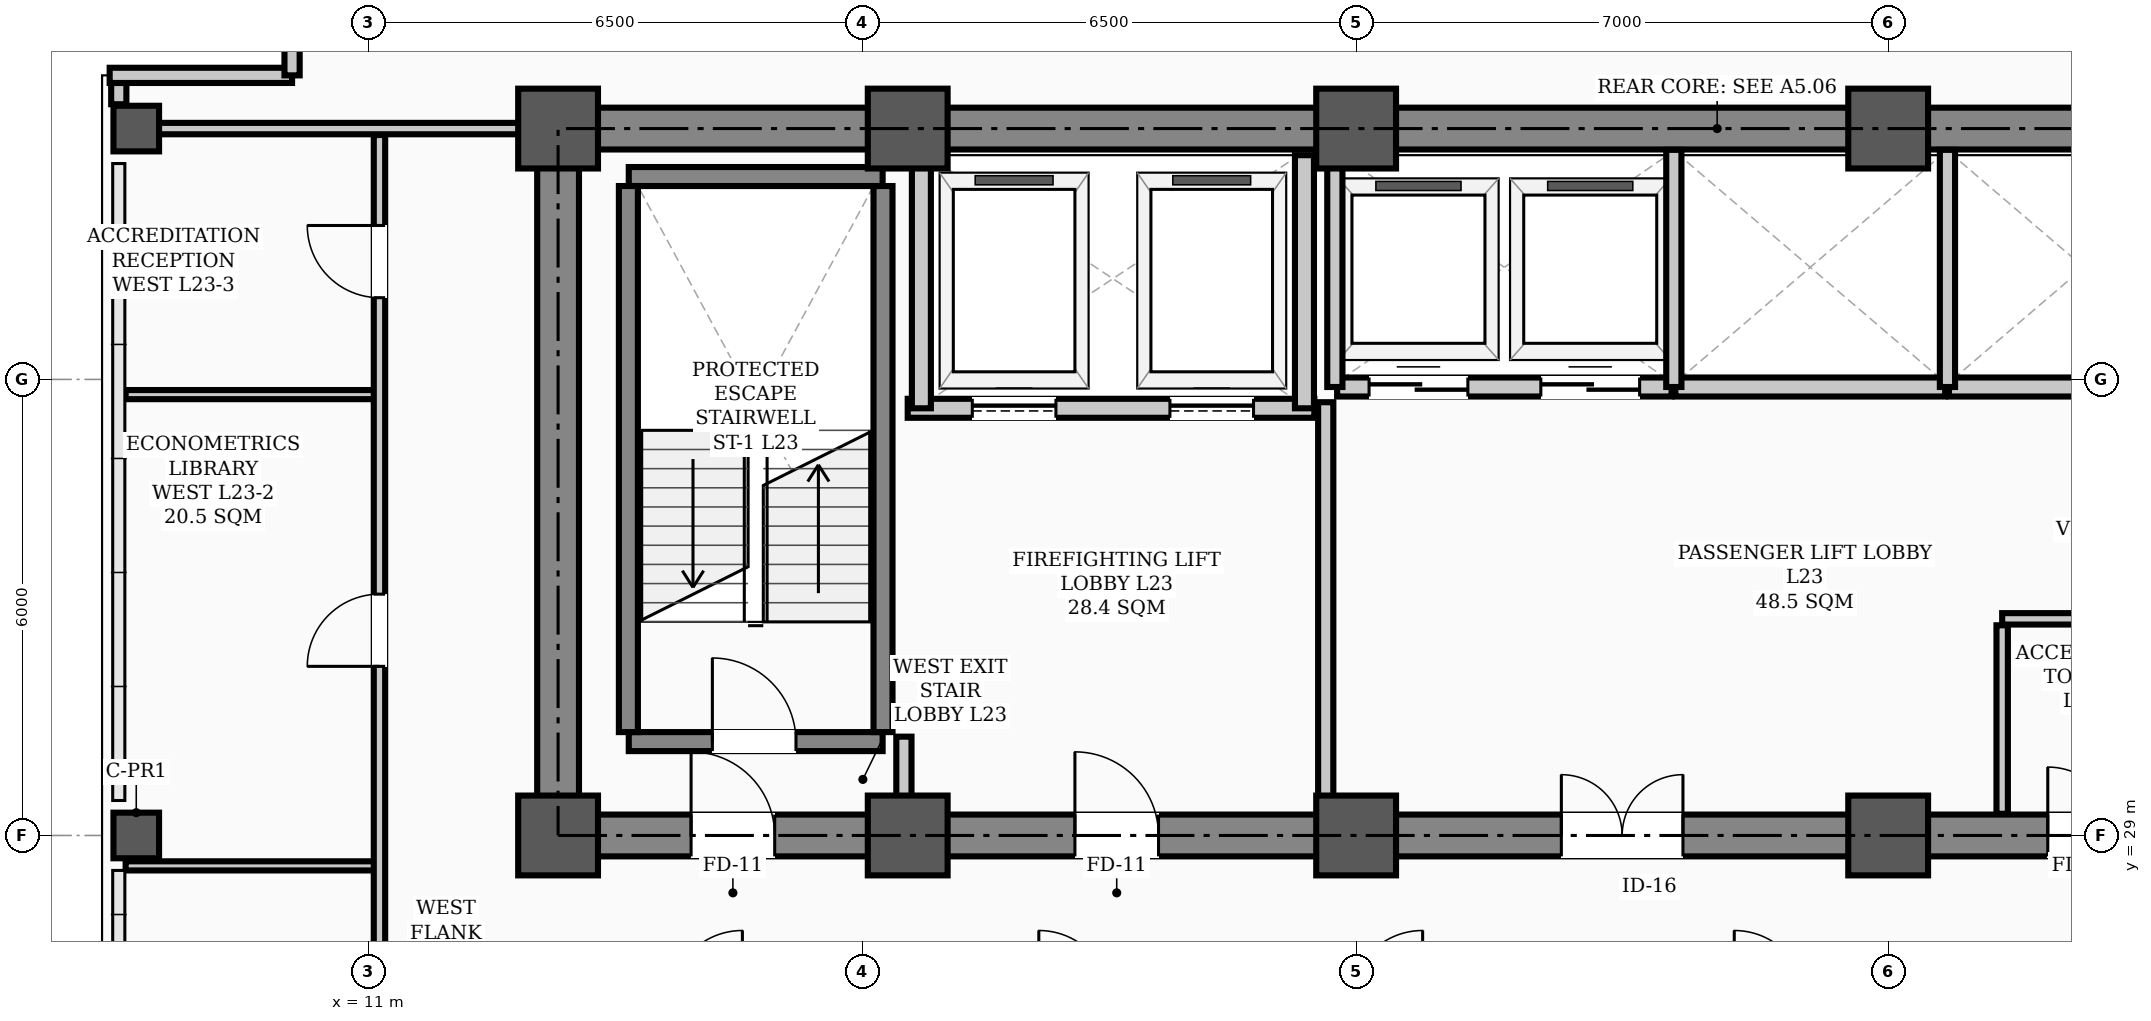
"""IFC4 building model, lengths in metres.
Left out: names, types, materials, properties, quantities, classifications, styles, units other than length and angle.
Written with IfcOpenShell. Run it as: python <this file> out.ifc"""

import sys

from ifc_helpers import new_model, si_unit, direction, frame, frame_2d, origin, origin_2d, place, context, subcontext, project, spatial, rectangle, hollow_rectangle, extrude, element, fill, save


model = new_model("IFC4")
c1 = context("Model", 3, precision=1e-05, world=origin(), true_north=direction((0.0, 1.0)))
c2 = subcontext(c1, "Body", "Model", "MODEL_VIEW")
j1 = project(units=[si_unit("LENGTHUNIT", "METRE"), si_unit("PLANEANGLEUNIT", "RADIAN")], contexts=[c1])
p1 = place(None, origin())
s1 = spatial("IfcSite", under=j1, at=p1, CompositionType="ELEMENT")
p2 = place(p1, origin())
s2 = spatial("IfcBuilding", under=s1, at=p2, CompositionType="ELEMENT")
p3 = place(p2, frame((0.0, 0.0, 92.8)))
s3 = spatial("IfcBuildingStorey", under=s2, at=p3, CompositionType="ELEMENT", Elevation=92.8)
for number, where, z_axis, x_axis in (
    (1, (13.5, 29.0, 0.0), (0.0, 0.0, 1.0), (1.0, 0.0, 0.0)),
    (2, (13.5, 38.3, 0.0), (0.0, 0.0, 1.0), (1.0, 0.0, 0.0)),
    (3, (18.1, 29.0, 0.0), (0.0, 0.0, 1.0), (1.0, 0.0, 0.0)),
    (4, (18.1, 38.3, 0.0), (0.0, 0.0, 1.0), (1.0, 0.0, 0.0)),
    (5, (24.0, 29.0, 0.0), (0.0, 0.0, 1.0), (1.0, 0.0, 0.0)),
    (6, (24.0, 38.3, 0.0), (0.0, 0.0, 1.0), (1.0, 0.0, 0.0)),
    (7, (31.0, 29.0, 0.0), (0.0, 0.0, 1.0), (1.0, 0.0, 0.0)),
    (8, (31.0, 38.3, 0.0), (0.0, 0.0, 1.0), (1.0, 0.0, 0.0)),
):
    element("IfcColumn", number, at=place(p3, frame(where, z_axis=z_axis, x_axis=x_axis)), inside=s3, PredefinedType="COLUMN", context=c2, shape_type="SweptSolid", body=[
        extrude(hollow_rectangle(XDim=1.05, YDim=1.05, WallThickness=0.038, InnerFilletRadius=0.019, OuterFilletRadius=0.057, at=origin_2d()), origin(), (0.0, 0.0, 1.0), 3.9),
    ])
for number, where, z_axis, x_axis in (
    (9, (7.95, 29.0, 0.0), (0.0, 0.0, 1.0), (1.0, 0.0, 0.0)),
    (10, (7.95, 38.3, 0.0), (0.0, 0.0, 1.0), (1.0, 0.0, 0.0)),
):
    element("IfcColumn", number, at=place(p3, frame(where, z_axis=z_axis, x_axis=x_axis)), inside=s3, PredefinedType="COLUMN", context=c2, shape_type="SweptSolid", body=[
        extrude(hollow_rectangle(XDim=0.6, YDim=0.6, WallThickness=0.026, InnerFilletRadius=0.013, OuterFilletRadius=0.039, at=origin_2d()), origin(), (0.0, 0.0, 1.0), 3.9),
    ])
p4 = place(p3, frame((7.72, 38.62, 0.0), z_axis=(0.0, 0.0, 1.0), x_axis=(0.0, 1.0, 0.0)))
e11 = element("IfcWall", 11, at=p4, inside=s3, PredefinedType="PARAPET", context=c2, shape_type="SweptSolid", body=[
    extrude(rectangle(XDim=0.28, YDim=0.2, at=frame_2d((0.14, 0.0))), origin(), (0.0, 0.0, 1.0), 1.2),
])
for number, where, z_axis, x_axis in (
    (12, (7.6, 39.0, 0.0), (0.0, 0.0, 1.0), (1.0, 0.0, 0.0)),
    (13, (10.0, 39.0, 0.0), (0.0, 0.0, 1.0), (0.0, 1.0, 0.0)),
):
    element("IfcWall", number, at=place(p3, frame(where, z_axis=z_axis, x_axis=x_axis)), inside=s3, PredefinedType="PARAPET", context=c2, shape_type="SweptSolid", body=[
        extrude(rectangle(XDim=2.4, YDim=0.2, at=frame_2d((1.2, 0.0))), origin(), (0.0, 0.0, 1.0), 1.2),
    ])
p5 = place(p3, frame((13.5, 29.0, 0.0), z_axis=(0.0, 0.0, 1.0), x_axis=(1.0, 0.0, 0.0)))
e14 = element("IfcWall", 14, at=p5, inside=s3, PredefinedType="SHEAR", context=c2, shape_type="SweptSolid", body=[
    extrude(rectangle(XDim=30.5, YDim=0.55, at=frame_2d((15.25, 0.0))), origin(), (0.0, 0.0, 1.0), 3.72),
])
p6 = place(p5, frame((1.75, 0.0, 0.0)))
e15 = element("IfcOpeningElement", 15, at=p6, cuts=e14, PredefinedType="OPENING", context=c2, shape_type="SweptSolid", body=[
    extrude(rectangle(XDim=1.1, YDim=2.08, at=frame_2d((0.55, 1.04))), frame((0.0, 0.285, 0.0), z_axis=(0.0, -1.0, 0.0), x_axis=(1.0, 0.0, 0.0)), (0.0, 0.0, 1.0), 0.57),
])
p7 = place(p5, frame((26.7, 0.0, 0.0)))
e16 = element("IfcOpeningElement", 16, at=p7, cuts=e14, PredefinedType="OPENING", context=c2, shape_type="SweptSolid", body=[
    extrude(rectangle(XDim=1.1, YDim=2.08, at=frame_2d((0.55, 1.04))), frame((0.0, 0.285, 0.0), z_axis=(0.0, -1.0, 0.0), x_axis=(1.0, 0.0, 0.0)), (0.0, 0.0, 1.0), 0.57),
])
p8 = place(p5, frame((6.8, 0.0, 0.0)))
e17 = element("IfcOpeningElement", 17, at=p8, cuts=e14, PredefinedType="OPENING", context=c2, shape_type="SweptSolid", body=[
    extrude(rectangle(XDim=1.1, YDim=2.08, at=frame_2d((0.55, 1.04))), frame((0.0, 0.285, 0.0), z_axis=(0.0, -1.0, 0.0), x_axis=(1.0, 0.0, 0.0)), (0.0, 0.0, 1.0), 0.57),
])
p9 = place(p5, frame((13.2, 0.0, 0.0)))
e18 = element("IfcOpeningElement", 18, at=p9, cuts=e14, PredefinedType="OPENING", context=c2, shape_type="SweptSolid", body=[
    extrude(rectangle(XDim=1.6, YDim=2.08, at=frame_2d((0.8, 1.04))), frame((0.0, 0.285, 0.0), z_axis=(0.0, -1.0, 0.0), x_axis=(1.0, 0.0, 0.0)), (0.0, 0.0, 1.0), 0.57),
])
p10 = place(p5, frame((19.6, 0.0, 0.0)))
e19 = element("IfcOpeningElement", 19, at=p10, cuts=e14, PredefinedType="OPENING", context=c2, shape_type="SweptSolid", body=[
    extrude(rectangle(XDim=0.9, YDim=2.08, at=frame_2d((0.45, 1.04))), frame((0.0, 0.285, 0.0), z_axis=(0.0, -1.0, 0.0), x_axis=(1.0, 0.0, 0.0)), (0.0, 0.0, 1.0), 0.57),
])
p11 = place(p5, frame((21.6, 0.0, 0.0)))
e20 = element("IfcOpeningElement", 20, at=p11, cuts=e14, PredefinedType="OPENING", context=c2, shape_type="SweptSolid", body=[
    extrude(rectangle(XDim=0.9, YDim=2.08, at=frame_2d((0.45, 1.04))), frame((0.0, 0.285, 0.0), z_axis=(0.0, -1.0, 0.0), x_axis=(1.0, 0.0, 0.0)), (0.0, 0.0, 1.0), 0.57),
])
p12 = place(p3, frame((13.5, 38.3, 0.0), z_axis=(0.0, 0.0, 1.0), x_axis=(1.0, 0.0, 0.0)))
e21 = element("IfcWall", 21, at=p12, inside=s3, PredefinedType="SHEAR", context=c2, shape_type="SweptSolid", body=[
    extrude(rectangle(XDim=30.5, YDim=0.55, at=frame_2d((15.25, 0.0))), origin(), (0.0, 0.0, 1.0), 3.72),
])
p13 = place(p3, frame((13.5, 29.35, 0.0), z_axis=(0.0, 0.0, 1.0), x_axis=(0.0, 1.0, 0.0)))
e22 = element("IfcWall", 22, at=p13, inside=s3, PredefinedType="SHEAR", context=c2, shape_type="SweptSolid", body=[
    extrude(rectangle(XDim=8.6, YDim=0.55, at=frame_2d((4.3, 0.0))), origin(), (0.0, 0.0, 1.0), 3.72),
])
p14 = place(p3, frame((14.43, 30.235, 0.0), z_axis=(0.0, 0.0, 1.0), x_axis=(1.0, 0.0, 0.0)))
e23 = element("IfcWall", 23, at=p14, inside=s3, PredefinedType="STANDARD", context=c2, shape_type="SweptSolid", body=[
    extrude(rectangle(XDim=3.34, YDim=0.25, at=frame_2d((1.67, 0.0))), origin(), (0.0, 0.0, 1.0), 3.72),
])
p15 = place(p14, frame((1.1, 0.0, 0.0)))
e24 = element("IfcOpeningElement", 24, at=p15, cuts=e23, PredefinedType="OPENING", context=c2, shape_type="SweptSolid", body=[
    extrude(rectangle(XDim=1.1, YDim=2.08, at=frame_2d((0.55, 1.04))), frame((0.0, 0.135, 0.0), z_axis=(0.0, -1.0, 0.0), x_axis=(1.0, 0.0, 0.0)), (0.0, 0.0, 1.0), 0.27),
])
p16 = place(p3, frame((14.43, 37.669, 0.0), z_axis=(0.0, 0.0, 1.0), x_axis=(1.0, 0.0, 0.0)))
e25 = element("IfcWall", 25, at=p16, inside=s3, PredefinedType="STANDARD", context=c2, shape_type="SweptSolid", body=[
    extrude(rectangle(XDim=3.34, YDim=0.25, at=frame_2d((1.67, 0.0))), origin(), (0.0, 0.0, 1.0), 3.72),
])
for number, where, z_axis, x_axis in (
    (26, (14.425, 30.36, 0.0), (0.0, 0.0, 1.0), (0.0, 1.0, 0.0)),
    (27, (17.775, 30.36, 0.0), (0.0, 0.0, 1.0), (0.0, 1.0, 0.0)),
):
    element("IfcWall", number, at=place(p3, frame(where, z_axis=z_axis, x_axis=x_axis)), inside=s3, PredefinedType="STANDARD", context=c2, shape_type="SweptSolid", body=[
        extrude(rectangle(XDim=7.184, YDim=0.25, at=frame_2d((3.592, 0.0))), origin(), (0.0, 0.0, 1.0), 3.72),
    ])
p17 = place(p3, frame((18.1, 34.62, 0.0), z_axis=(0.0, 0.0, 1.0), x_axis=(1.0, 0.0, 0.0)))
e28 = element("IfcWall", 28, at=p17, inside=s3, PredefinedType="STANDARD", context=c2, shape_type="SweptSolid", body=[
    extrude(rectangle(XDim=5.35, YDim=0.25, at=frame_2d((2.675, 0.0))), origin(), (0.0, 0.0, 1.0), 3.72),
])
p18 = place(p17, frame((0.85, 0.0, 0.0)))
e29 = element("IfcOpeningElement", 29, at=p18, cuts=e28, PredefinedType="OPENING", context=c2, shape_type="SweptSolid", body=[
    extrude(rectangle(XDim=1.1, YDim=2.08, at=frame_2d((0.55, 1.04))), frame((0.0, 0.135, 0.0), z_axis=(0.0, -1.0, 0.0), x_axis=(1.0, 0.0, 0.0)), (0.0, 0.0, 1.0), 0.27),
])
p19 = place(p17, frame((3.45, 0.0, 0.0)))
e30 = element("IfcOpeningElement", 30, at=p19, cuts=e28, PredefinedType="OPENING", context=c2, shape_type="SweptSolid", body=[
    extrude(rectangle(XDim=1.1, YDim=2.08, at=frame_2d((0.55, 1.04))), frame((0.0, 0.135, 0.0), z_axis=(0.0, -1.0, 0.0), x_axis=(1.0, 0.0, 0.0)), (0.0, 0.0, 1.0), 0.27),
])
for number, where, z_axis, x_axis in (
    (31, (18.28, 34.62, 0.0), (0.0, 0.0, 1.0), (0.0, 1.0, 0.0)),
    (32, (23.32, 34.62, 0.0), (0.0, 0.0, 1.0), (0.0, 1.0, 0.0)),
):
    element("IfcWall", number, at=place(p3, frame(where, z_axis=z_axis, x_axis=x_axis)), inside=s3, PredefinedType="STANDARD", context=c2, shape_type="SweptSolid", body=[
        extrude(rectangle(XDim=3.33, YDim=0.25, at=frame_2d((1.665, 0.0))), origin(), (0.0, 0.0, 1.0), 3.3),
    ])
p20 = place(p3, frame((23.75, 34.9, 0.0), z_axis=(0.0, 0.0, 1.0), x_axis=(1.0, 0.0, 0.0)))
e33 = element("IfcWall", 33, at=p20, inside=s3, PredefinedType="STANDARD", context=c2, shape_type="SweptSolid", body=[
    extrude(rectangle(XDim=4.4, YDim=0.25, at=frame_2d((2.2, 0.0))), origin(), (0.0, 0.0, 1.0), 3.72),
])
p21 = place(p20, frame((0.42, 0.0, 0.0)))
e34 = element("IfcOpeningElement", 34, at=p21, cuts=e33, PredefinedType="OPENING", context=c2, shape_type="SweptSolid", body=[
    extrude(rectangle(XDim=1.3, YDim=2.08, at=frame_2d((0.65, 1.04))), frame((0.0, 0.135, 0.0), z_axis=(0.0, -1.0, 0.0), x_axis=(1.0, 0.0, 0.0)), (0.0, 0.0, 1.0), 0.27),
])
p22 = place(p20, frame((2.68, 0.0, 0.0)))
e35 = element("IfcOpeningElement", 35, at=p22, cuts=e33, PredefinedType="OPENING", context=c2, shape_type="SweptSolid", body=[
    extrude(rectangle(XDim=1.3, YDim=2.08, at=frame_2d((0.65, 1.04))), frame((0.0, 0.135, 0.0), z_axis=(0.0, -1.0, 0.0), x_axis=(1.0, 0.0, 0.0)), (0.0, 0.0, 1.0), 0.27),
])
p23 = place(p3, frame((28.2, 34.9, 0.0), z_axis=(0.0, 0.0, 1.0), x_axis=(1.0, 0.0, 0.0)))
e36 = element("IfcWall", 36, at=p23, inside=s3, PredefinedType="STANDARD", context=c2, shape_type="SweptSolid", body=[
    extrude(rectangle(XDim=3.55, YDim=0.25, at=frame_2d((1.775, 0.0))), origin(), (0.0, 0.0, 1.0), 3.72),
])
p24 = place(p3, frame((31.8, 34.9, 0.0), z_axis=(0.0, 0.0, 1.0), x_axis=(1.0, 0.0, 0.0)))
e37 = element("IfcWall", 37, at=p24, inside=s3, PredefinedType="STANDARD", context=c2, shape_type="SweptSolid", body=[
    extrude(rectangle(XDim=3.6, YDim=0.25, at=frame_2d((1.8, 0.0))), origin(), (0.0, 0.0, 1.0), 3.72),
])
p25 = place(p3, frame((32.5, 31.85, 0.0), z_axis=(0.0, 0.0, 1.0), x_axis=(1.0, 0.0, 0.0)))
e38 = element("IfcWall", 38, at=p25, inside=s3, PredefinedType="PARTITIONING", context=c2, shape_type="SweptSolid", body=[
    extrude(rectangle(XDim=4.1, YDim=0.15, at=frame_2d((2.05, 0.0))), origin(), (0.0, 0.0, 1.0), 3.72),
])
p26 = place(p3, frame((7.81, 38.3, 0.0), z_axis=(0.0, 0.0, 1.0), x_axis=(1.0, 0.0, 0.0)))
e39 = element("IfcWall", 39, at=p26, inside=s3, PredefinedType="PARTITIONING", context=c2, shape_type="SweptSolid", body=[
    extrude(rectangle(XDim=5.69, YDim=0.15, at=frame_2d((2.845, 0.0))), origin(), (0.0, 0.0, 1.0), 3.0),
])
p27 = place(p3, frame((7.81, 28.6, 0.0), z_axis=(0.0, 0.0, 1.0), x_axis=(1.0, 0.0, 0.0)))
e40 = element("IfcWall", 40, at=p27, inside=s3, PredefinedType="PARTITIONING", context=c2, shape_type="SweptSolid", body=[
    extrude(rectangle(XDim=3.34, YDim=0.12, at=frame_2d((1.67, 0.0))), origin(), (0.0, 0.0, 1.0), 3.0),
])
p28 = place(p3, frame((7.81, 34.8, 0.0), z_axis=(0.0, 0.0, 1.0), x_axis=(1.0, 0.0, 0.0)))
e41 = element("IfcWall", 41, at=p28, inside=s3, PredefinedType="PARTITIONING", context=c2, shape_type="SweptSolid", body=[
    extrude(rectangle(XDim=3.34, YDim=0.12, at=frame_2d((1.67, 0.0))), origin(), (0.0, 0.0, 1.0), 3.212),
])
p29 = place(p3, frame((18.05, 29.285, 0.0), z_axis=(0.0, 0.0, 1.0), x_axis=(0.0, 1.0, 0.0)))
e42 = element("IfcWall", 42, at=p29, inside=s3, PredefinedType="STANDARD", context=c2, shape_type="SweptSolid", body=[
    extrude(rectangle(XDim=1.015, YDim=0.2, at=frame_2d((0.508, 0.0))), origin(), (0.0, 0.0, 1.0), 3.3),
])
p30 = place(p3, frame((23.6, 29.285, 0.0), z_axis=(0.0, 0.0, 1.0), x_axis=(0.0, 1.0, 0.0)))
e43 = element("IfcWall", 43, at=p30, inside=s3, PredefinedType="STANDARD", context=c2, shape_type="SweptSolid", body=[
    extrude(rectangle(XDim=5.415, YDim=0.2, at=frame_2d((2.708, 0.0))), origin(), (0.0, 0.0, 1.0), 3.1),
])
p31 = place(p3, frame((32.5, 29.285, 0.0), z_axis=(0.0, 0.0, 1.0), x_axis=(0.0, 1.0, 0.0)))
e44 = element("IfcWall", 44, at=p31, inside=s3, PredefinedType="PARTITIONING", context=c2, shape_type="SweptSolid", body=[
    extrude(rectangle(XDim=2.48, YDim=0.15, at=frame_2d((1.24, 0.0))), origin(), (0.0, 0.0, 1.0), 3.3),
])
p32 = place(p3, frame((11.15, 17.635, 0.0), z_axis=(0.0, 0.0, 1.0), x_axis=(0.0, 1.0, 0.0)))
e45 = element("IfcWall", 45, at=p32, inside=s3, PredefinedType="PARTITIONING", context=c2, shape_type="SweptSolid", body=[
    extrude(rectangle(XDim=20.58, YDim=0.15, at=frame_2d((10.29, 0.0))), origin(), (0.0, 0.0, 1.0), 3.0),
])
p33 = place(p32, frame((4.965, 0.0, 0.0)))
e46 = element("IfcOpeningElement", 46, at=p33, cuts=e45, PredefinedType="OPENING", context=c2, shape_type="SweptSolid", body=[
    extrude(rectangle(XDim=0.95, YDim=2.08, at=frame_2d((0.475, 1.04))), frame((0.0, 0.085, 0.0), z_axis=(0.0, -1.0, 0.0), x_axis=(1.0, 0.0, 0.0)), (0.0, 0.0, 1.0), 0.17),
])
p34 = place(p32, frame((13.59, 0.0, 0.0)))
e47 = element("IfcOpeningElement", 47, at=p34, cuts=e45, PredefinedType="OPENING", context=c2, shape_type="SweptSolid", body=[
    extrude(rectangle(XDim=0.95, YDim=2.08, at=frame_2d((0.475, 1.04))), frame((0.0, 0.085, 0.0), z_axis=(0.0, -1.0, 0.0), x_axis=(1.0, 0.0, 0.0)), (0.0, 0.0, 1.0), 0.17),
])
p35 = place(p32, frame((18.44, 0.0, 0.0)))
e48 = element("IfcOpeningElement", 48, at=p35, cuts=e45, PredefinedType="OPENING", context=c2, shape_type="SweptSolid", body=[
    extrude(rectangle(XDim=0.95, YDim=2.08, at=frame_2d((0.475, 1.04))), frame((0.0, 0.085, 0.0), z_axis=(0.0, -1.0, 0.0), x_axis=(1.0, 0.0, 0.0)), (0.0, 0.0, 1.0), 0.17),
])
p36 = place(p3, frame((23.72, 34.9, 0.0), z_axis=(0.0, 0.0, 1.0), x_axis=(0.0, 1.0, 0.0)))
e49 = element("IfcWall", 49, at=p36, inside=s3, PredefinedType="STANDARD", context=c2, shape_type="SweptSolid", body=[
    extrude(rectangle(XDim=3.12, YDim=0.2, at=frame_2d((1.56, 0.0))), origin(), (0.0, 0.0, 1.0), 3.1),
])
for number, where, z_axis, x_axis in (
    (50, (28.18, 34.9, 0.0), (0.0, 0.0, 1.0), (0.0, 1.0, 0.0)),
    (51, (31.78, 34.9, 0.0), (0.0, 0.0, 1.0), (0.0, 1.0, 0.0)),
):
    element("IfcWall", number, at=place(p3, frame(where, z_axis=z_axis, x_axis=x_axis)), inside=s3, PredefinedType="STANDARD", context=c2, shape_type="SweptSolid", body=[
        extrude(rectangle(XDim=3.12, YDim=0.2, at=frame_2d((1.56, 0.0))), origin(), (0.0, 0.0, 1.0), 3.3),
    ])
p37 = place(p15, origin())
e52 = element("IfcDoor", 52, at=p37, inside=s3, OperationType="SINGLE_SWING_LEFT", PredefinedType="DOOR", context=c2, shape_type="SweptSolid", body=[
    extrude(rectangle(XDim=1.1, YDim=2.08, at=frame_2d((0.55, 1.04))), frame((0.0, 0.025, 0.0), z_axis=(0.0, -1.0, 0.0), x_axis=(1.0, 0.0, 0.0)), (0.0, 0.0, 1.0), 0.05),
])
fill(e24, e52)
p38 = place(p6, origin())
e53 = element("IfcDoor", 53, at=p38, inside=s3, OperationType="SINGLE_SWING_LEFT", PredefinedType="DOOR", context=c2, shape_type="SweptSolid", body=[
    extrude(rectangle(XDim=1.1, YDim=2.08, at=frame_2d((0.55, 1.04))), frame((0.0, 0.025, 0.0), z_axis=(0.0, -1.0, 0.0), x_axis=(1.0, 0.0, 0.0)), (0.0, 0.0, 1.0), 0.05),
])
fill(e15, e53)
p39 = place(p8, origin())
e54 = element("IfcDoor", 54, at=p39, inside=s3, OperationType="SINGLE_SWING_LEFT", PredefinedType="DOOR", context=c2, shape_type="SweptSolid", body=[
    extrude(rectangle(XDim=1.1, YDim=2.08, at=frame_2d((0.55, 1.04))), frame((0.0, 0.025, 0.0), z_axis=(0.0, -1.0, 0.0), x_axis=(1.0, 0.0, 0.0)), (0.0, 0.0, 1.0), 0.05),
])
fill(e17, e54)
p40 = place(p9, origin())
e55 = element("IfcDoor", 55, at=p40, inside=s3, OperationType="DOUBLE_DOOR_SINGLE_SWING", PredefinedType="DOOR", context=c2, shape_type="SweptSolid", body=[
    extrude(rectangle(XDim=1.6, YDim=2.08, at=frame_2d((0.8, 1.04))), frame((0.0, 0.025, 0.0), z_axis=(0.0, -1.0, 0.0), x_axis=(1.0, 0.0, 0.0)), (0.0, 0.0, 1.0), 0.05),
])
fill(e18, e55)
p41 = place(p10, origin())
e56 = element("IfcDoor", 56, at=p41, inside=s3, OperationType="SINGLE_SWING_LEFT", PredefinedType="DOOR", context=c2, shape_type="SweptSolid", body=[
    extrude(rectangle(XDim=0.9, YDim=2.08, at=frame_2d((0.45, 1.04))), frame((0.0, 0.025, 0.0), z_axis=(0.0, -1.0, 0.0), x_axis=(1.0, 0.0, 0.0)), (0.0, 0.0, 1.0), 0.05),
])
fill(e19, e56)
p42 = place(p34, origin())
e57 = element("IfcDoor", 57, at=p42, inside=s3, OperationType="SINGLE_SWING_LEFT", PredefinedType="DOOR", context=c2, shape_type="SweptSolid", body=[
    extrude(rectangle(XDim=0.95, YDim=2.08, at=frame_2d((0.475, 1.04))), frame((0.0, 0.025, 0.0), z_axis=(0.0, -1.0, 0.0), x_axis=(1.0, 0.0, 0.0)), (0.0, 0.0, 1.0), 0.05),
])
fill(e47, e57)
p43 = place(p35, origin())
e58 = element("IfcDoor", 58, at=p43, inside=s3, OperationType="SINGLE_SWING_RIGHT", PredefinedType="DOOR", context=c2, shape_type="SweptSolid", body=[
    extrude(rectangle(XDim=0.95, YDim=2.08, at=frame_2d((0.475, 1.04))), frame((0.0, 0.025, 0.0), z_axis=(0.0, -1.0, 0.0), x_axis=(1.0, 0.0, 0.0)), (0.0, 0.0, 1.0), 0.05),
])
fill(e48, e58)
p44 = place(p18, origin())
e59 = element("IfcDoor", 59, at=p44, inside=s3, OperationType="SLIDING_TO_LEFT", PredefinedType="DOOR", context=c2, shape_type="SweptSolid", body=[
    extrude(rectangle(XDim=1.1, YDim=2.08, at=frame_2d((0.55, 1.04))), frame((0.0, 0.025, 0.0), z_axis=(0.0, -1.0, 0.0), x_axis=(1.0, 0.0, 0.0)), (0.0, 0.0, 1.0), 0.05),
])
fill(e29, e59)
p45 = place(p19, origin())
e60 = element("IfcDoor", 60, at=p45, inside=s3, OperationType="SLIDING_TO_LEFT", PredefinedType="DOOR", context=c2, shape_type="SweptSolid", body=[
    extrude(rectangle(XDim=1.1, YDim=2.08, at=frame_2d((0.55, 1.04))), frame((0.0, 0.025, 0.0), z_axis=(0.0, -1.0, 0.0), x_axis=(1.0, 0.0, 0.0)), (0.0, 0.0, 1.0), 0.05),
])
fill(e30, e60)
p46 = place(p21, origin())
e61 = element("IfcDoor", 61, at=p46, inside=s3, OperationType="DOUBLE_DOOR_SLIDING", PredefinedType="DOOR", context=c2, shape_type="SweptSolid", body=[
    extrude(rectangle(XDim=1.3, YDim=2.08, at=frame_2d((0.65, 1.04))), frame((0.0, 0.025, 0.0), z_axis=(0.0, -1.0, 0.0), x_axis=(1.0, 0.0, 0.0)), (0.0, 0.0, 1.0), 0.05),
])
fill(e34, e61)
p47 = place(p22, origin())
e62 = element("IfcDoor", 62, at=p47, inside=s3, OperationType="DOUBLE_DOOR_SLIDING", PredefinedType="DOOR", context=c2, shape_type="SweptSolid", body=[
    extrude(rectangle(XDim=1.3, YDim=2.08, at=frame_2d((0.65, 1.04))), frame((0.0, 0.025, 0.0), z_axis=(0.0, -1.0, 0.0), x_axis=(1.0, 0.0, 0.0)), (0.0, 0.0, 1.0), 0.05),
])
fill(e35, e62)
save(model, sys.argv[1])
